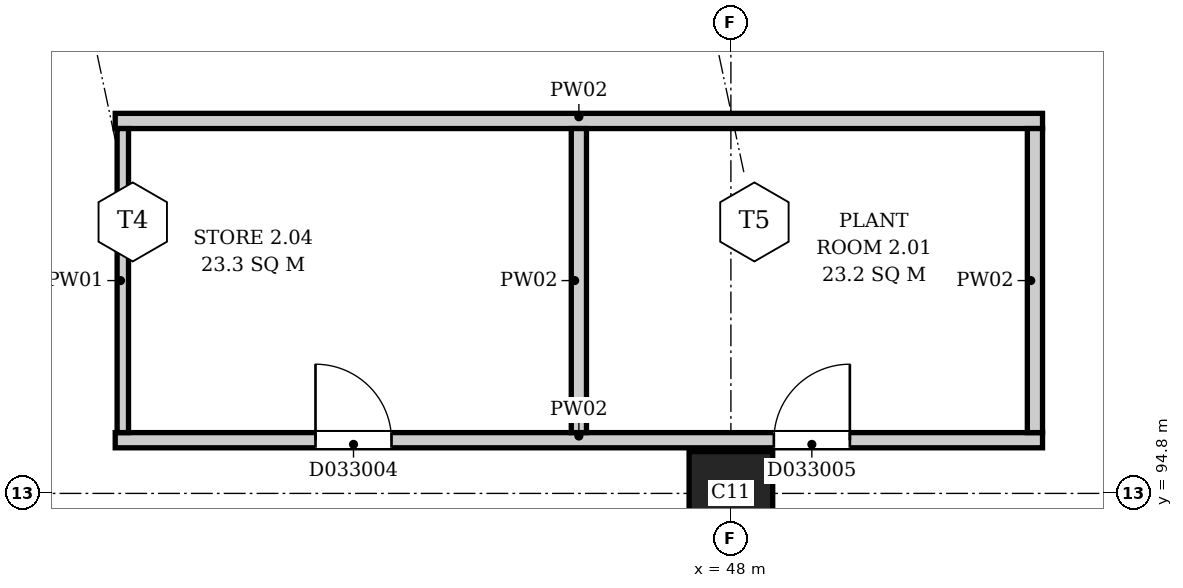
"""IFC4 building model, lengths in metres.
Left out: names, types, materials, properties, quantities, classifications, styles, units other than length and angle.
Written with IfcOpenShell. Run it as: python <this file> out.ifc"""

import sys

from ifc_helpers import new_model, si_unit, direction, frame, frame_2d, origin, origin_2d, place, context, subcontext, project, spatial, rectangle, extrude, element, fill, save


model = new_model("IFC4")
c1 = context("Model", 3, precision=1e-05, world=origin(), true_north=direction((0.0, 1.0)))
c2 = subcontext(c1, "Body", "Model", "MODEL_VIEW")
j1 = project(units=[si_unit("LENGTHUNIT", "METRE"), si_unit("PLANEANGLEUNIT", "RADIAN")], contexts=[c1])
p1 = place(None, origin())
s1 = spatial("IfcSite", under=j1, at=p1, CompositionType="ELEMENT")
p2 = place(p1, origin())
s2 = spatial("IfcBuilding", under=s1, at=p2, CompositionType="ELEMENT")
p3 = place(p2, frame((0.0, 0.0, 14.2)))
s3 = spatial("IfcBuildingStorey", under=s2, at=p3, CompositionType="ELEMENT", Elevation=14.2)
p4 = place(p3, frame((48.0, 94.8, 0.0), z_axis=(0.0, 0.0, 1.0), x_axis=(1.0, 0.0, 0.0)))
e1 = element("IfcColumn", 1, at=p4, inside=s3, PredefinedType="COLUMN", context=c2, shape_type="SweptSolid", body=[
    extrude(rectangle(XDim=1.1, YDim=1.1, at=origin_2d()), origin(), (0.0, 0.0, 1.0), 7.5),
])
p5 = place(p3, frame((39.9, 95.5, 0.0), z_axis=(0.0, 0.0, 1.0), x_axis=(1.0, 0.0, 0.0)))
e2 = element("IfcWall", 2, at=p5, inside=s3, PredefinedType="PARTITIONING", context=c2, shape_type="SweptSolid", body=[
    extrude(rectangle(XDim=12.2, YDim=0.2, at=frame_2d((6.1, 0.0))), origin(), (0.0, 0.0, 1.0), 7.15),
])
p6 = place(p5, frame((2.635, 0.0, 0.0)))
e3 = element("IfcOpeningElement", 3, at=p6, cuts=e2, PredefinedType="OPENING", context=c2, shape_type="SweptSolid", body=[
    extrude(rectangle(XDim=1.0, YDim=2.1, at=frame_2d((0.5, 1.05))), frame((0.0, 0.11, 0.0), z_axis=(0.0, -1.0, 0.0), x_axis=(1.0, 0.0, 0.0)), (0.0, 0.0, 1.0), 0.22),
])
p7 = place(p5, frame((8.665, 0.0, 0.0)))
e4 = element("IfcOpeningElement", 4, at=p7, cuts=e2, PredefinedType="OPENING", context=c2, shape_type="SweptSolid", body=[
    extrude(rectangle(XDim=1.0, YDim=2.1, at=frame_2d((0.5, 1.05))), frame((0.0, 0.11, 0.0), z_axis=(0.0, -1.0, 0.0), x_axis=(1.0, 0.0, 0.0)), (0.0, 0.0, 1.0), 0.22),
])
p8 = place(p3, frame((39.9, 99.7, 0.0), z_axis=(0.0, 0.0, 1.0), x_axis=(1.0, 0.0, 0.0)))
e5 = element("IfcWall", 5, at=p8, inside=s3, PredefinedType="PARTITIONING", context=c2, shape_type="SweptSolid", body=[
    extrude(rectangle(XDim=12.2, YDim=0.2, at=frame_2d((6.1, 0.0))), origin(), (0.0, 0.0, 1.0), 7.15),
])
p9 = place(p3, frame((40.0, 95.6, 0.0), z_axis=(0.0, 0.0, 1.0), x_axis=(0.0, 1.0, 0.0)))
e6 = element("IfcWall", 6, at=p9, inside=s3, PredefinedType="PARTITIONING", context=c2, shape_type="SweptSolid", body=[
    extrude(rectangle(XDim=4.0, YDim=0.15, at=frame_2d((2.0, 0.0))), origin(), (0.0, 0.0, 1.0), 7.15),
])
for number, where, z_axis, x_axis in (
    (7, (46.0, 95.6, 0.0), (0.0, 0.0, 1.0), (0.0, 1.0, 0.0)),
    (8, (52.0, 95.6, 0.0), (0.0, 0.0, 1.0), (0.0, 1.0, 0.0)),
):
    element("IfcWall", number, at=place(p3, frame(where, z_axis=z_axis, x_axis=x_axis)), inside=s3, PredefinedType="PARTITIONING", context=c2, shape_type="SweptSolid", body=[
        extrude(rectangle(XDim=4.0, YDim=0.2, at=frame_2d((2.0, 0.0))), origin(), (0.0, 0.0, 1.0), 7.15),
    ])
p10 = place(p6, origin())
e9 = element("IfcDoor", 9, at=p10, inside=s3, OperationType="SINGLE_SWING_LEFT", PredefinedType="DOOR", context=c2, shape_type="SweptSolid", body=[
    extrude(rectangle(XDim=1.0, YDim=2.1, at=frame_2d((0.5, 1.05))), frame((0.0, 0.025, 0.0), z_axis=(0.0, -1.0, 0.0), x_axis=(1.0, 0.0, 0.0)), (0.0, 0.0, 1.0), 0.05),
])
fill(e3, e9)
p11 = place(p7, origin())
e10 = element("IfcDoor", 10, at=p11, inside=s3, OperationType="SINGLE_SWING_RIGHT", PredefinedType="DOOR", context=c2, shape_type="SweptSolid", body=[
    extrude(rectangle(XDim=1.0, YDim=2.1, at=frame_2d((0.5, 1.05))), frame((0.0, 0.025, 0.0), z_axis=(0.0, -1.0, 0.0), x_axis=(1.0, 0.0, 0.0)), (0.0, 0.0, 1.0), 0.05),
])
fill(e4, e10)
save(model, sys.argv[1])
